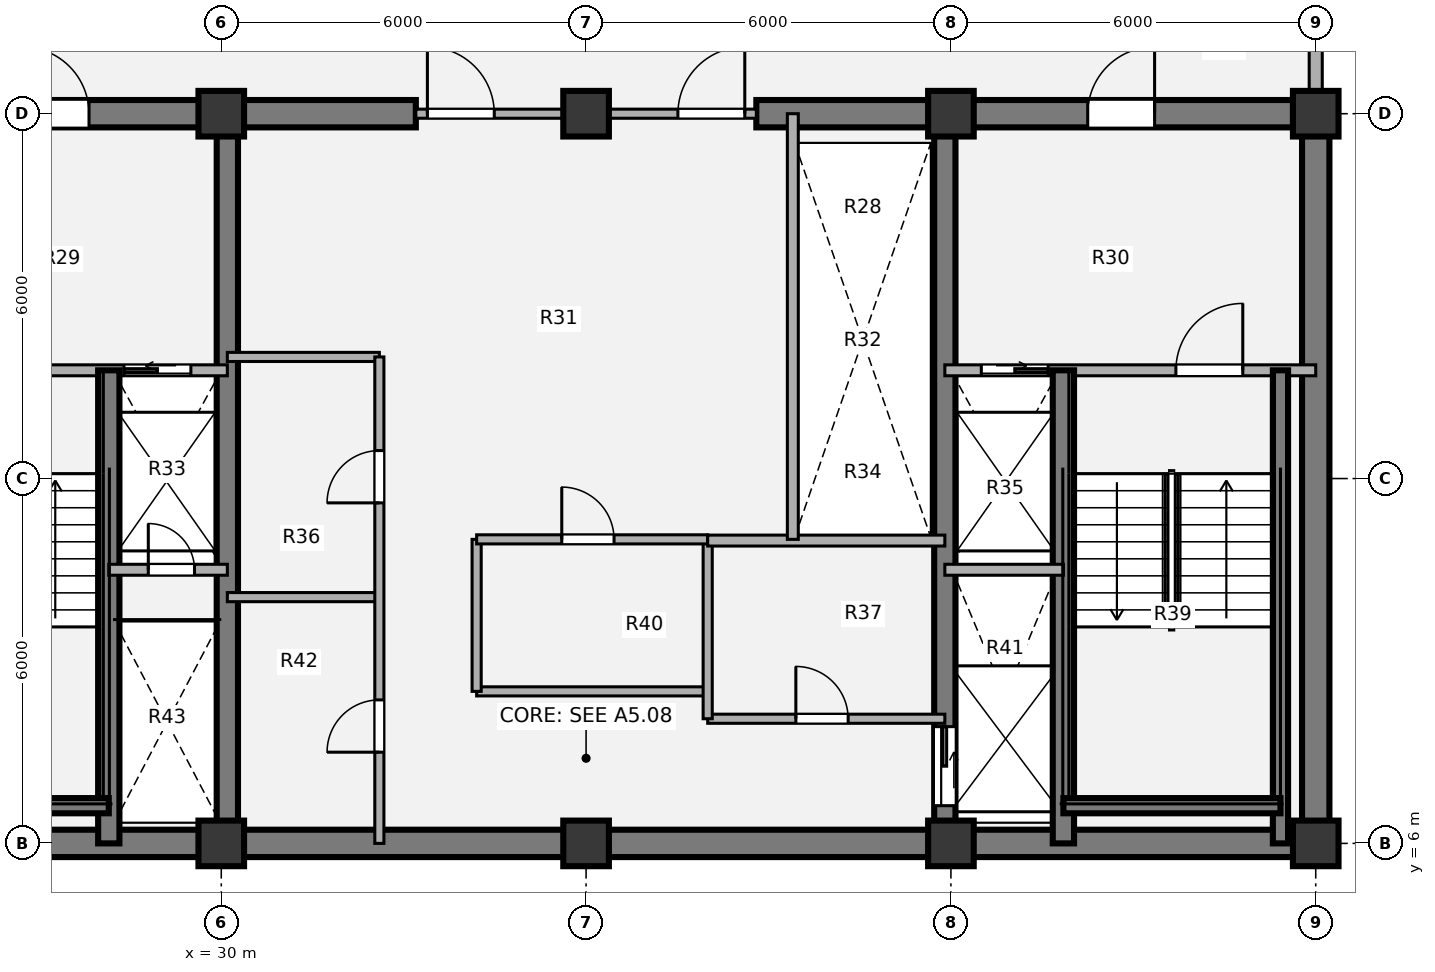
"""IFC4 building model, lengths in metres.
Left out: names, types, materials, properties, quantities, classifications, styles, units other than length and angle.
Written with IfcOpenShell. Run it as: python <this file> out.ifc"""

import sys

from ifc_helpers import new_model, si_unit, direction, frame, frame_2d, origin, origin_2d, place, context, subcontext, project, spatial, rectangle, extrude, source, transform, mapped, element, fill, save


model = new_model("IFC4")
c1 = context("Model", 3, precision=1e-05, world=origin(), true_north=direction((0.0, 1.0)))
c2 = subcontext(c1, "Body", "Model", "MODEL_VIEW")
j1 = project(units=[si_unit("LENGTHUNIT", "METRE"), si_unit("PLANEANGLEUNIT", "RADIAN")], contexts=[c1])
p1 = place(None, origin())
s1 = spatial("IfcSite", under=j1, at=p1, CompositionType="ELEMENT")
p2 = place(p1, origin())
s2 = spatial("IfcBuilding", under=s1, at=p2, CompositionType="ELEMENT")
p3 = place(p2, frame((0.0, 0.0, 205.56)))
s3 = spatial("IfcBuildingStorey", under=s2, at=p3, CompositionType="ELEMENT", Elevation=205.56)
m1 = source(origin(), c2, "Body", "SweptSolid", [
    extrude(rectangle(XDim=0.75, YDim=0.75, at=origin_2d()), origin(), (0.0, 0.0, 1.0), 3.78),
])
for number, where, z_axis, x_axis in (
    (1, (30.0, 6.0, 0.0), (0.0, 0.0, 1.0), (1.0, 0.0, 0.0)),
    (2, (36.0, 6.0, 0.0), (0.0, 0.0, 1.0), (1.0, 0.0, 0.0)),
    (3, (42.0, 6.0, 0.0), (0.0, 0.0, 1.0), (1.0, 0.0, 0.0)),
    (4, (48.0, 6.0, 0.0), (0.0, 0.0, 1.0), (1.0, 0.0, 0.0)),
    (5, (30.0, 18.0, 0.0), (0.0, 0.0, 1.0), (1.0, 0.0, 0.0)),
    (6, (36.0, 18.0, 0.0), (0.0, 0.0, 1.0), (1.0, 0.0, 0.0)),
    (7, (42.0, 18.0, 0.0), (0.0, 0.0, 1.0), (1.0, 0.0, 0.0)),
    (8, (48.0, 18.0, 0.0), (0.0, 0.0, 1.0), (1.0, 0.0, 0.0)),
):
    element("IfcColumn", number, at=place(p3, frame(where, z_axis=z_axis, x_axis=x_axis)), inside=s3, PredefinedType="COLUMN", context=c2, shape_type="MappedRepresentation", body=[
        mapped(m1, transform((0.0, 0.0, 0.0), x_axis=(1.0, 0.0, 0.0), y_axis=(0.0, 1.0, 0.0), z_axis=(0.0, 0.0, 1.0), scale=1.0)),
    ])
p4 = place(p3, frame((48.225, 6.0, 0.0), z_axis=(0.0, 0.0, 1.0), x_axis=(-1.0, 0.0, 0.0)))
e9 = element("IfcWall", 9, at=p4, inside=s3, PredefinedType="SHEAR", context=c2, shape_type="SweptSolid", body=[
    extrude(rectangle(XDim=24.45, YDim=0.45, at=frame_2d((12.225, 0.0))), origin(), (0.0, 0.0, 1.0), 3.78),
])
p5 = place(p3, frame((48.0, 18.0, 0.0), z_axis=(0.0, 0.0, 1.0), x_axis=(0.0, -1.0, 0.0)))
e10 = element("IfcWall", 10, at=p5, inside=s3, PredefinedType="SHEAR", context=c2, shape_type="SweptSolid", body=[
    extrude(rectangle(XDim=12.0, YDim=0.45, at=frame_2d((6.0, 0.0))), origin(), (0.0, 0.0, 1.0), 3.78),
])
p6 = place(p3, frame((23.775, 18.0, 0.0), z_axis=(0.0, 0.0, 1.0), x_axis=(1.0, 0.0, 0.0)))
e11 = element("IfcWall", 11, at=p6, inside=s3, PredefinedType="SHEAR", context=c2, shape_type="SweptSolid", body=[
    extrude(rectangle(XDim=9.425, YDim=0.45, at=frame_2d((4.712, 0.0))), origin(), (0.0, 0.0, 1.0), 3.78),
])
p7 = place(p6, frame((2.95, 0.0, 0.0)))
e12 = element("IfcOpeningElement", 12, at=p7, cuts=e11, PredefinedType="OPENING", context=c2, shape_type="SweptSolid", body=[
    extrude(rectangle(XDim=1.1, YDim=2.1, at=origin_2d()), frame((0.55, 0.235, 1.05), z_axis=(0.0, -1.0, 0.0), x_axis=(1.0, 0.0, 0.0)), (0.0, 0.0, 1.0), 0.47),
])
p8 = place(p3, frame((38.8, 18.0, 0.0), z_axis=(0.0, 0.0, 1.0), x_axis=(1.0, 0.0, 0.0)))
e13 = element("IfcWall", 13, at=p8, inside=s3, PredefinedType="SHEAR", context=c2, shape_type="SweptSolid", body=[
    extrude(rectangle(XDim=9.425, YDim=0.45, at=frame_2d((4.712, 0.0))), origin(), (0.0, 0.0, 1.0), 3.78),
])
p9 = place(p8, frame((5.45, 0.0, 0.0)))
e14 = element("IfcOpeningElement", 14, at=p9, cuts=e13, PredefinedType="OPENING", context=c2, shape_type="SweptSolid", body=[
    extrude(rectangle(XDim=1.1, YDim=2.1, at=origin_2d()), frame((0.55, 0.235, 1.05), z_axis=(0.0, -1.0, 0.0), x_axis=(1.0, 0.0, 0.0)), (0.0, 0.0, 1.0), 0.47),
])
p10 = place(p3, frame((30.1, 6.0, 0.0), z_axis=(0.0, 0.0, 1.0), x_axis=(0.0, 1.0, 0.0)))
e15 = element("IfcWall", 15, at=p10, inside=s3, PredefinedType="SHEAR", context=c2, shape_type="SweptSolid", body=[
    extrude(rectangle(XDim=12.0, YDim=0.35, at=frame_2d((6.0, 0.0))), origin(), (0.0, 0.0, 1.0), 3.78),
])
p11 = place(p3, frame((41.9, 18.0, 0.0), z_axis=(0.0, 0.0, 1.0), x_axis=(0.0, -1.0, 0.0)))
e16 = element("IfcWall", 16, at=p11, inside=s3, PredefinedType="SHEAR", context=c2, shape_type="SweptSolid", body=[
    extrude(rectangle(XDim=12.0, YDim=0.35, at=frame_2d((6.0, 0.0))), origin(), (0.0, 0.0, 1.0), 3.78),
])
p12 = place(p11, frame((10.08, 0.0, 0.0)))
e17 = element("IfcOpeningElement", 17, at=p12, cuts=e16, PredefinedType="OPENING", context=c2, shape_type="SweptSolid", body=[
    extrude(rectangle(XDim=1.3, YDim=2.1, at=origin_2d()), frame((0.65, 0.185, 1.05), z_axis=(0.0, -1.0, 0.0), x_axis=(1.0, 0.0, 0.0)), (0.0, 0.0, 1.0), 0.37),
])
p13 = place(p3, frame((48.0, 21.05, 0.0), z_axis=(0.0, 0.0, 1.0), x_axis=(0.0, -1.0, 0.0)))
e18 = element("IfcWall", 18, at=p13, inside=s3, PredefinedType="SOLIDWALL", context=c2, shape_type="SweptSolid", body=[
    extrude(rectangle(XDim=2.695, YDim=0.215, at=frame_2d((1.348, 0.0))), origin(), (0.0, 0.0, 1.0), 2.718),
])
p14 = place(p3, frame((30.1, 14.0, 0.0), z_axis=(0.0, 0.0, 1.0), x_axis=(1.0, 0.0, 0.0)))
e19 = element("IfcWall", 19, at=p14, inside=s3, PredefinedType="PARTITIONING", context=c2, shape_type="SweptSolid", body=[
    extrude(rectangle(XDim=2.5, YDim=0.15, at=frame_2d((1.25, 0.0))), origin(), (0.0, 0.0, 1.0), 3.5),
])
p15 = place(p3, frame((34.2, 8.5, 0.0), z_axis=(0.0, 0.0, 1.0), x_axis=(1.0, 0.0, 0.0)))
e20 = element("IfcWall", 20, at=p15, inside=s3, PredefinedType="PARTITIONING", context=c2, shape_type="SweptSolid", body=[
    extrude(rectangle(XDim=3.8, YDim=0.15, at=frame_2d((1.9, 0.0))), origin(), (0.0, 0.0, 1.0), 3.5),
])
p16 = place(p3, frame((38.0, 8.05, 0.0), z_axis=(0.0, 0.0, 1.0), x_axis=(1.0, 0.0, 0.0)))
e21 = element("IfcWall", 21, at=p16, inside=s3, PredefinedType="PARTITIONING", context=c2, shape_type="SweptSolid", body=[
    extrude(rectangle(XDim=3.9, YDim=0.15, at=frame_2d((1.95, 0.0))), origin(), (0.0, 0.0, 1.0), 3.5),
])
p17 = place(p16, frame((1.45, 0.0, 0.0)))
e22 = element("IfcOpeningElement", 22, at=p17, cuts=e21, PredefinedType="OPENING", context=c2, shape_type="SweptSolid", body=[
    extrude(rectangle(XDim=0.86, YDim=2.1, at=origin_2d()), frame((0.43, 0.085, 1.05), z_axis=(0.0, -1.0, 0.0), x_axis=(1.0, 0.0, 0.0)), (0.0, 0.0, 1.0), 0.17),
])
p18 = place(p3, frame((34.2, 8.5, 0.0), z_axis=(0.0, 0.0, 1.0), x_axis=(0.0, 1.0, 0.0)))
e23 = element("IfcWall", 23, at=p18, inside=s3, PredefinedType="PARTITIONING", context=c2, shape_type="SweptSolid", body=[
    extrude(rectangle(XDim=2.5, YDim=0.15, at=frame_2d((1.25, 0.0))), origin(), (0.0, 0.0, 1.0), 3.5),
])
p19 = place(p3, frame((38.0, 8.05, 0.0), z_axis=(0.0, 0.0, 1.0), x_axis=(0.0, 1.0, 0.0)))
e24 = element("IfcWall", 24, at=p19, inside=s3, PredefinedType="PARTITIONING", context=c2, shape_type="SweptSolid", body=[
    extrude(rectangle(XDim=2.95, YDim=0.15, at=frame_2d((1.475, 0.0))), origin(), (0.0, 0.0, 1.0), 3.5),
])
p20 = place(p3, frame((34.2, 11.0, 0.0), z_axis=(0.0, 0.0, 1.0), x_axis=(1.0, 0.0, 0.0)))
e25 = element("IfcWall", 25, at=p20, inside=s3, PredefinedType="PARTITIONING", context=c2, shape_type="SweptSolid", body=[
    extrude(rectangle(XDim=3.8, YDim=0.15, at=frame_2d((1.9, 0.0))), origin(), (0.0, 0.0, 1.0), 3.5),
])
p21 = place(p20, frame((1.4, 0.0, 0.0)))
e26 = element("IfcOpeningElement", 26, at=p21, cuts=e25, PredefinedType="OPENING", context=c2, shape_type="SweptSolid", body=[
    extrude(rectangle(XDim=0.86, YDim=2.1, at=origin_2d()), frame((0.43, 0.085, 1.05), z_axis=(0.0, -1.0, 0.0), x_axis=(1.0, 0.0, 0.0)), (0.0, 0.0, 1.0), 0.17),
])
p22 = place(p3, frame((38.0, 10.98, 0.0), z_axis=(0.0, 0.0, 1.0), x_axis=(1.0, 0.0, 0.0)))
e27 = element("IfcWall", 27, at=p22, inside=s3, PredefinedType="PARTITIONING", context=c2, shape_type="SweptSolid", body=[
    extrude(rectangle(XDim=3.9, YDim=0.18, at=frame_2d((1.95, 0.0))), origin(), (0.0, 0.0, 1.0), 3.5),
])
p23 = place(p3, frame((39.4, 11.0, 0.0), z_axis=(0.0, 0.0, 1.0), x_axis=(0.0, 1.0, 0.0)))
e28 = element("IfcWall", 28, at=p23, inside=s3, PredefinedType="PARTITIONING", context=c2, shape_type="SweptSolid", body=[
    extrude(rectangle(XDim=7.0, YDim=0.18, at=frame_2d((3.5, 0.0))), origin(), (0.0, 0.0, 1.0), 3.5),
])
p24 = place(p3, frame((30.1, 10.05, 0.0), z_axis=(0.0, 0.0, 1.0), x_axis=(1.0, 0.0, 0.0)))
e29 = element("IfcWall", 29, at=p24, inside=s3, PredefinedType="PARTITIONING", context=c2, shape_type="SweptSolid", body=[
    extrude(rectangle(XDim=2.5, YDim=0.15, at=frame_2d((1.25, 0.0))), origin(), (0.0, 0.0, 1.0), 3.5),
])
p25 = place(p3, frame((32.6, 6.0, 0.0), z_axis=(0.0, 0.0, 1.0), x_axis=(0.0, 1.0, 0.0)))
e30 = element("IfcWall", 30, at=p25, inside=s3, PredefinedType="PARTITIONING", context=c2, shape_type="SweptSolid", body=[
    extrude(rectangle(XDim=8.0, YDim=0.15, at=frame_2d((4.0, 0.0))), origin(), (0.0, 0.0, 1.0), 3.5),
])
p26 = place(p25, frame((1.5, 0.0, 0.0)))
e31 = element("IfcOpeningElement", 31, at=p26, cuts=e30, PredefinedType="OPENING", context=c2, shape_type="SweptSolid", body=[
    extrude(rectangle(XDim=0.86, YDim=2.1, at=origin_2d()), frame((0.43, 0.085, 1.05), z_axis=(0.0, -1.0, 0.0), x_axis=(1.0, 0.0, 0.0)), (0.0, 0.0, 1.0), 0.17),
])
p27 = place(p25, frame((5.6, 0.0, 0.0)))
e32 = element("IfcOpeningElement", 32, at=p27, cuts=e30, PredefinedType="OPENING", context=c2, shape_type="SweptSolid", body=[
    extrude(rectangle(XDim=0.86, YDim=2.1, at=origin_2d()), frame((0.43, 0.085, 1.05), z_axis=(0.0, -1.0, 0.0), x_axis=(1.0, 0.0, 0.0)), (0.0, 0.0, 1.0), 0.17),
])
p28 = place(p3, frame((33.2, 18.0, 0.0), z_axis=(0.0, 0.0, 1.0), x_axis=(1.0, 0.0, 0.0)))
e33 = element("IfcWall", 33, at=p28, inside=s3, PredefinedType="PARTITIONING", context=c2, shape_type="SweptSolid", body=[
    extrude(rectangle(XDim=5.6, YDim=0.15, at=frame_2d((2.8, 0.0))), origin(), (0.0, 0.0, 1.0), 2.515),
])
p29 = place(p28, frame((0.19, 0.0, 0.0)))
e34 = element("IfcOpeningElement", 34, at=p29, cuts=e33, PredefinedType="OPENING", context=c2, shape_type="SweptSolid", body=[
    extrude(rectangle(XDim=1.1, YDim=2.1, at=origin_2d()), frame((0.55, 0.085, 1.05), z_axis=(0.0, -1.0, 0.0), x_axis=(1.0, 0.0, 0.0)), (0.0, 0.0, 1.0), 0.17),
])
p30 = place(p28, frame((4.31, 0.0, 0.0)))
e35 = element("IfcOpeningElement", 35, at=p30, cuts=e33, PredefinedType="OPENING", context=c2, shape_type="SweptSolid", body=[
    extrude(rectangle(XDim=1.1, YDim=2.1, at=origin_2d()), frame((0.55, 0.085, 1.05), z_axis=(0.0, -1.0, 0.0), x_axis=(1.0, 0.0, 0.0)), (0.0, 0.0, 1.0), 0.17),
])
p31 = place(p3, frame((24.0, 13.78, 0.0), z_axis=(0.0, 0.0, 1.0), x_axis=(1.0, 0.0, 0.0)))
e36 = element("IfcWall", 36, at=p31, inside=s3, PredefinedType="PARTITIONING", context=c2, shape_type="SweptSolid", body=[
    extrude(rectangle(XDim=6.1, YDim=0.18, at=frame_2d((3.05, 0.0))), origin(), (0.0, 0.0, 1.0), 3.5),
])
p32 = place(p31, frame((1.15, 0.0, 0.0)))
e37 = element("IfcOpeningElement", 37, at=p32, cuts=e36, PredefinedType="OPENING", context=c2, shape_type="SweptSolid", body=[
    extrude(rectangle(XDim=1.1, YDim=2.1, at=origin_2d()), frame((0.55, 0.1, 1.05), z_axis=(0.0, -1.0, 0.0), x_axis=(1.0, 0.0, 0.0)), (0.0, 0.0, 1.0), 0.2),
])
p33 = place(p31, frame((4.4, 0.0, 0.0)))
e38 = element("IfcOpeningElement", 38, at=p33, cuts=e36, PredefinedType="OPENING", context=c2, shape_type="SweptSolid", body=[
    extrude(rectangle(XDim=1.1, YDim=2.1, at=origin_2d()), frame((0.55, 0.1, 1.05), z_axis=(0.0, -1.0, 0.0), x_axis=(1.0, 0.0, 0.0)), (0.0, 0.0, 1.0), 0.2),
])
p34 = place(p3, frame((28.15, 6.0, 0.0), z_axis=(0.0, 0.0, 1.0), x_axis=(0.0, 1.0, 0.0)))
e39 = element("IfcWall", 39, at=p34, inside=s3, PredefinedType="SHEAR", context=c2, shape_type="SweptSolid", body=[
    extrude(rectangle(XDim=7.78, YDim=0.35, at=frame_2d((3.89, 0.0))), origin(), (0.0, 0.0, 1.0), 3.85),
])
p35 = place(p3, frame((24.58, 6.62, 0.0), z_axis=(0.0, 0.0, 1.0), x_axis=(1.0, 0.0, 0.0)))
e40 = element("IfcWall", 40, at=p35, inside=s3, PredefinedType="SHEAR", context=c2, shape_type="SweptSolid", body=[
    extrude(rectangle(XDim=3.57, YDim=0.25, at=frame_2d((1.785, 0.0))), origin(), (0.0, 0.0, 1.0), 3.85),
])
p36 = place(p3, frame((28.15, 10.5, 0.0), z_axis=(0.0, 0.0, 1.0), x_axis=(1.0, 0.0, 0.0)))
e41 = element("IfcWall", 41, at=p36, inside=s3, PredefinedType="PARTITIONING", context=c2, shape_type="SweptSolid", body=[
    extrude(rectangle(XDim=1.95, YDim=0.18, at=frame_2d((0.975, 0.0))), origin(), (0.0, 0.0, 1.0), 3.5),
])
p37 = place(p36, frame((0.65, 0.0, 0.0)))
e42 = element("IfcOpeningElement", 42, at=p37, cuts=e41, PredefinedType="OPENING", context=c2, shape_type="SweptSolid", body=[
    extrude(rectangle(XDim=0.76, YDim=2.05, at=origin_2d()), frame((0.38, 0.1, 1.025), z_axis=(0.0, -1.0, 0.0), x_axis=(1.0, 0.0, 0.0)), (0.0, 0.0, 1.0), 0.2),
])
p38 = place(p3, frame((41.9, 13.78, 0.0), z_axis=(0.0, 0.0, 1.0), x_axis=(1.0, 0.0, 0.0)))
e43 = element("IfcWall", 43, at=p38, inside=s3, PredefinedType="PARTITIONING", context=c2, shape_type="SweptSolid", body=[
    extrude(rectangle(XDim=6.1, YDim=0.18, at=frame_2d((3.05, 0.0))), origin(), (0.0, 0.0, 1.0), 3.5),
])
p39 = place(p38, frame((0.6, 0.0, 0.0)))
e44 = element("IfcOpeningElement", 44, at=p39, cuts=e43, PredefinedType="OPENING", context=c2, shape_type="SweptSolid", body=[
    extrude(rectangle(XDim=1.1, YDim=2.1, at=origin_2d()), frame((0.55, 0.1, 1.05), z_axis=(0.0, -1.0, 0.0), x_axis=(1.0, 0.0, 0.0)), (0.0, 0.0, 1.0), 0.2),
])
p40 = place(p38, frame((3.8, 0.0, 0.0)))
e45 = element("IfcOpeningElement", 45, at=p40, cuts=e43, PredefinedType="OPENING", context=c2, shape_type="SweptSolid", body=[
    extrude(rectangle(XDim=1.1, YDim=2.1, at=origin_2d()), frame((0.55, 0.1, 1.05), z_axis=(0.0, -1.0, 0.0), x_axis=(1.0, 0.0, 0.0)), (0.0, 0.0, 1.0), 0.2),
])
p41 = place(p3, frame((43.85, 6.0, 0.0), z_axis=(0.0, 0.0, 1.0), x_axis=(0.0, 1.0, 0.0)))
e46 = element("IfcWall", 46, at=p41, inside=s3, PredefinedType="SHEAR", context=c2, shape_type="SweptSolid", body=[
    extrude(rectangle(XDim=7.78, YDim=0.35, at=frame_2d((3.89, 0.0))), origin(), (0.0, 0.0, 1.0), 3.85),
])
p42 = place(p3, frame((47.42, 6.0, 0.0), z_axis=(0.0, 0.0, 1.0), x_axis=(0.0, 1.0, 0.0)))
e47 = element("IfcWall", 47, at=p42, inside=s3, PredefinedType="SHEAR", context=c2, shape_type="SweptSolid", body=[
    extrude(rectangle(XDim=7.78, YDim=0.25, at=frame_2d((3.89, 0.0))), origin(), (0.0, 0.0, 1.0), 3.85),
])
p43 = place(p3, frame((43.85, 6.62, 0.0), z_axis=(0.0, 0.0, 1.0), x_axis=(1.0, 0.0, 0.0)))
e48 = element("IfcWall", 48, at=p43, inside=s3, PredefinedType="SHEAR", context=c2, shape_type="SweptSolid", body=[
    extrude(rectangle(XDim=3.57, YDim=0.25, at=frame_2d((1.785, 0.0))), origin(), (0.0, 0.0, 1.0), 3.85),
])
p44 = place(p3, frame((41.9, 10.5, 0.0), z_axis=(0.0, 0.0, 1.0), x_axis=(1.0, 0.0, 0.0)))
e49 = element("IfcWall", 49, at=p44, inside=s3, PredefinedType="PARTITIONING", context=c2, shape_type="SweptSolid", body=[
    extrude(rectangle(XDim=1.95, YDim=0.18, at=frame_2d((0.975, 0.0))), origin(), (0.0, 0.0, 1.0), 3.5),
])
m2 = source(origin(), c2, "Body", "SweptSolid", [
    extrude(rectangle(XDim=0.86, YDim=2.1, at=origin_2d()), frame((0.43, 0.025, 1.05), z_axis=(0.0, -1.0, 0.0), x_axis=(1.0, 0.0, 0.0)), (0.0, 0.0, 1.0), 0.05),
])
p45 = place(p17, origin())
e50 = element("IfcDoor", 50, at=p45, inside=s3, OperationType="SINGLE_SWING_LEFT", PredefinedType="DOOR", context=c2, shape_type="MappedRepresentation", body=[
    mapped(m2, transform((0.0, 0.0, 0.0), x_axis=(1.0, 0.0, 0.0), y_axis=(0.0, 1.0, 0.0), z_axis=(0.0, 0.0, 1.0), scale=1.0)),
])
fill(e22, e50)
p46 = place(p21, origin())
e51 = element("IfcDoor", 51, at=p46, inside=s3, OperationType="SINGLE_SWING_LEFT", PredefinedType="DOOR", context=c2, shape_type="MappedRepresentation", body=[
    mapped(m2, transform((0.0, 0.0, 0.0), x_axis=(1.0, 0.0, 0.0), y_axis=(0.0, 1.0, 0.0), z_axis=(0.0, 0.0, 1.0), scale=1.0)),
])
fill(e26, e51)
p47 = place(p26, origin())
e52 = element("IfcDoor", 52, at=p47, inside=s3, OperationType="SINGLE_SWING_LEFT", PredefinedType="DOOR", context=c2, shape_type="MappedRepresentation", body=[
    mapped(m2, transform((0.0, 0.0, 0.0), x_axis=(1.0, 0.0, 0.0), y_axis=(0.0, 1.0, 0.0), z_axis=(0.0, 0.0, 1.0), scale=1.0)),
])
fill(e31, e52)
p48 = place(p27, origin())
e53 = element("IfcDoor", 53, at=p48, inside=s3, OperationType="SINGLE_SWING_LEFT", PredefinedType="DOOR", context=c2, shape_type="MappedRepresentation", body=[
    mapped(m2, transform((0.0, 0.0, 0.0), x_axis=(1.0, 0.0, 0.0), y_axis=(0.0, 1.0, 0.0), z_axis=(0.0, 0.0, 1.0), scale=1.0)),
])
fill(e32, e53)
m3 = source(origin(), c2, "Body", "SweptSolid", [
    extrude(rectangle(XDim=1.1, YDim=2.1, at=origin_2d()), frame((0.55, 0.025, 1.05), z_axis=(0.0, -1.0, 0.0), x_axis=(1.0, 0.0, 0.0)), (0.0, 0.0, 1.0), 0.05),
])
p49 = place(p29, origin())
e54 = element("IfcDoor", 54, at=p49, inside=s3, OperationType="SINGLE_SWING_LEFT", PredefinedType="DOOR", context=c2, shape_type="MappedRepresentation", body=[
    mapped(m3, transform((0.0, 0.0, 0.0), x_axis=(1.0, 0.0, 0.0), y_axis=(0.0, 1.0, 0.0), z_axis=(0.0, 0.0, 1.0), scale=1.0)),
])
fill(e34, e54)
p50 = place(p30, origin())
e55 = element("IfcDoor", 55, at=p50, inside=s3, OperationType="SINGLE_SWING_RIGHT", PredefinedType="DOOR", context=c2, shape_type="MappedRepresentation", body=[
    mapped(m3, transform((0.0, 0.0, 0.0), x_axis=(1.0, 0.0, 0.0), y_axis=(0.0, 1.0, 0.0), z_axis=(0.0, 0.0, 1.0), scale=1.0)),
])
fill(e35, e55)
m4 = source(origin(), c2, "Body", "SweptSolid", [
    extrude(rectangle(XDim=1.1, YDim=2.1, at=origin_2d()), frame((0.55, 0.025, 1.05), z_axis=(0.0, -1.0, 0.0), x_axis=(1.0, 0.0, 0.0)), (0.0, 0.0, 1.0), 0.05),
])
p51 = place(p33, origin())
e56 = element("IfcDoor", 56, at=p51, inside=s3, OperationType="SLIDING_TO_LEFT", PredefinedType="DOOR", context=c2, shape_type="MappedRepresentation", body=[
    mapped(m4, transform((0.0, 0.0, 0.0), x_axis=(1.0, 0.0, 0.0), y_axis=(0.0, 1.0, 0.0), z_axis=(0.0, 0.0, 1.0), scale=1.0)),
])
fill(e38, e56)
m5 = source(origin(), c2, "Body", "SweptSolid", [
    extrude(rectangle(XDim=0.76, YDim=2.05, at=origin_2d()), frame((0.38, 0.025, 1.025), z_axis=(0.0, -1.0, 0.0), x_axis=(1.0, 0.0, 0.0)), (0.0, 0.0, 1.0), 0.05),
])
p52 = place(p37, origin())
e57 = element("IfcDoor", 57, at=p52, inside=s3, OperationType="SINGLE_SWING_LEFT", PredefinedType="DOOR", context=c2, shape_type="MappedRepresentation", body=[
    mapped(m5, transform((0.0, 0.0, 0.0), x_axis=(1.0, 0.0, 0.0), y_axis=(0.0, 1.0, 0.0), z_axis=(0.0, 0.0, 1.0), scale=1.0)),
])
fill(e42, e57)
p53 = place(p39, origin())
e58 = element("IfcDoor", 58, at=p53, inside=s3, OperationType="SLIDING_TO_RIGHT", PredefinedType="DOOR", context=c2, shape_type="MappedRepresentation", body=[
    mapped(m4, transform((0.0, 0.0, 0.0), x_axis=(1.0, 0.0, 0.0), y_axis=(0.0, 1.0, 0.0), z_axis=(0.0, 0.0, 1.0), scale=1.0)),
])
fill(e44, e58)
m6 = source(origin(), c2, "Body", "SweptSolid", [
    extrude(rectangle(XDim=1.1, YDim=2.1, at=origin_2d()), frame((0.55, 0.025, 1.05), z_axis=(0.0, -1.0, 0.0), x_axis=(1.0, 0.0, 0.0)), (0.0, 0.0, 1.0), 0.05),
])
p54 = place(p40, origin())
e59 = element("IfcDoor", 59, at=p54, inside=s3, OperationType="SINGLE_SWING_RIGHT", PredefinedType="DOOR", context=c2, shape_type="MappedRepresentation", body=[
    mapped(m6, transform((0.0, 0.0, 0.0), x_axis=(1.0, 0.0, 0.0), y_axis=(0.0, 1.0, 0.0), z_axis=(0.0, 0.0, 1.0), scale=1.0)),
])
fill(e45, e59)
m7 = source(origin(), c2, "Body", "SweptSolid", [
    extrude(rectangle(XDim=1.3, YDim=2.1, at=origin_2d()), frame((0.65, 0.025, 1.05), z_axis=(0.0, -1.0, 0.0), x_axis=(1.0, 0.0, 0.0)), (0.0, 0.0, 1.0), 0.05),
])
p55 = place(p12, origin())
e60 = element("IfcDoor", 60, at=p55, inside=s3, OperationType="SLIDING_TO_LEFT", PredefinedType="DOOR", context=c2, shape_type="MappedRepresentation", body=[
    mapped(m7, transform((0.0, 0.0, 0.0), x_axis=(1.0, 0.0, 0.0), y_axis=(0.0, 1.0, 0.0), z_axis=(0.0, 0.0, 1.0), scale=1.0)),
])
fill(e17, e60)
p56 = place(p7, origin())
e61 = element("IfcDoor", 61, at=p56, inside=s3, OperationType="SINGLE_SWING_LEFT", PredefinedType="DOOR", context=c2, shape_type="MappedRepresentation", body=[
    mapped(m3, transform((0.0, 0.0, 0.0), x_axis=(1.0, 0.0, 0.0), y_axis=(0.0, 1.0, 0.0), z_axis=(0.0, 0.0, 1.0), scale=1.0)),
])
fill(e12, e61)
p57 = place(p9, origin())
e62 = element("IfcDoor", 62, at=p57, inside=s3, OperationType="SINGLE_SWING_RIGHT", PredefinedType="DOOR", context=c2, shape_type="MappedRepresentation", body=[
    mapped(m3, transform((0.0, 0.0, 0.0), x_axis=(1.0, 0.0, 0.0), y_axis=(0.0, 1.0, 0.0), z_axis=(0.0, 0.0, 1.0), scale=1.0)),
])
fill(e14, e62)
save(model, sys.argv[1])
